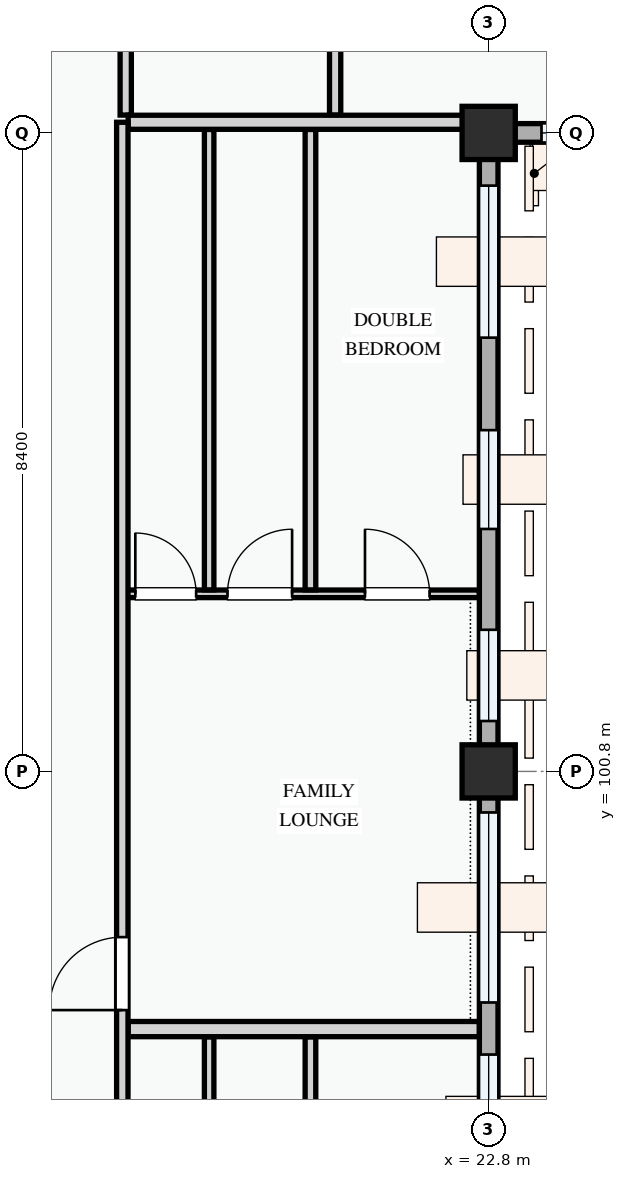
"""IFC4 building model, lengths in metres.
Left out: names, types, materials, properties, quantities, classifications, styles, units other than length and angle.
Written with IfcOpenShell. Run it as: python <this file> out.ifc"""

import sys

from ifc_helpers import new_model, si_unit, direction, frame, frame_2d, origin, origin_2d, place, context, subcontext, project, spatial, rectangle, extrude, element, fill, save


model = new_model("IFC4")
c1 = context("Model", 3, precision=1e-05, world=origin(), true_north=direction((0.0, 1.0)))
c2 = subcontext(c1, "Body", "Model", "MODEL_VIEW")
j1 = project(units=[si_unit("LENGTHUNIT", "METRE"), si_unit("PLANEANGLEUNIT", "RADIAN")], contexts=[c1])
p1 = place(None, origin())
s1 = spatial("IfcSite", under=j1, at=p1, CompositionType="ELEMENT")
p2 = place(p1, origin())
s2 = spatial("IfcBuilding", under=s1, at=p2, CompositionType="ELEMENT")
p3 = place(p2, frame((0.0, 0.0, 8.1)))
s3 = spatial("IfcBuildingStorey", under=s2, at=p3, CompositionType="ELEMENT", Elevation=8.1)
for number, where, z_axis, x_axis in (
    (1, (22.8, 100.8, 0.0), (0.0, 0.0, 1.0), (1.0, 0.0, 0.0)),
    (2, (22.8, 109.2, 0.0), (0.0, 0.0, 1.0), (1.0, 0.0, 0.0)),
):
    element("IfcColumn", number, at=place(p3, frame(where, z_axis=z_axis, x_axis=x_axis)), inside=s3, PredefinedType="COLUMN", context=c2, shape_type="SweptSolid", body=[
        extrude(rectangle(XDim=0.7, YDim=0.7, at=origin_2d()), origin(), (0.0, 0.0, 1.0), 3.3),
    ])
p4 = place(p3, frame((22.8, 109.2, 0.0), z_axis=(0.0, 0.0, 1.0), x_axis=(1.0, 0.0, 0.0)))
e3 = element("IfcWall", 3, at=p4, inside=s3, PredefinedType="STANDARD", context=c2, shape_type="SweptSolid", body=[
    extrude(rectangle(XDim=6.0, YDim=0.245, at=frame_2d((3.0, 0.0))), origin(), (0.0, 0.0, 1.0), 2.475),
])
p5 = place(p4, frame((0.695, 0.0, 0.78)))
e4 = element("IfcOpeningElement", 4, at=p5, cuts=e3, PredefinedType="OPENING", context=c2, shape_type="SweptSolid", body=[
    extrude(rectangle(XDim=1.15, YDim=1.25, at=frame_2d((0.575, 0.625))), frame((0.0, 0.133, 0.0), z_axis=(0.0, -1.0, 0.0), x_axis=(1.0, 0.0, 0.0)), (0.0, 0.0, 1.0), 0.265),
])
p6 = place(p4, frame((3.205, 0.0, 0.78)))
e5 = element("IfcOpeningElement", 5, at=p6, cuts=e3, PredefinedType="OPENING", context=c2, shape_type="SweptSolid", body=[
    extrude(rectangle(XDim=1.75, YDim=1.45, at=frame_2d((0.875, 0.725))), frame((0.0, 0.133, 0.0), z_axis=(0.0, -1.0, 0.0), x_axis=(1.0, 0.0, 0.0)), (0.0, 0.0, 1.0), 0.265),
])
p7 = place(p3, frame((22.8, 94.8, 0.0), z_axis=(0.0, 0.0, 1.0), x_axis=(0.0, 1.0, 0.0)))
e6 = element("IfcWall", 6, at=p7, inside=s3, PredefinedType="STANDARD", context=c2, shape_type="SweptSolid", body=[
    extrude(rectangle(XDim=6.0, YDim=0.245, at=frame_2d((3.0, 0.0))), origin(), (0.0, 0.0, 1.0), 2.575),
])
p8 = place(p7, frame((0.525, 0.0, 0.78)))
e7 = element("IfcOpeningElement", 7, at=p8, cuts=e6, PredefinedType="OPENING", context=c2, shape_type="SweptSolid", body=[
    extrude(rectangle(XDim=1.75, YDim=1.45, at=frame_2d((0.875, 0.725))), frame((0.0, 0.133, 0.0), z_axis=(0.0, -1.0, 0.0), x_axis=(1.0, 0.0, 0.0)), (0.0, 0.0, 1.0), 0.265),
])
p9 = place(p7, frame((2.96, 0.0, 0.78)))
e8 = element("IfcOpeningElement", 8, at=p9, cuts=e6, PredefinedType="OPENING", context=c2, shape_type="SweptSolid", body=[
    extrude(rectangle(XDim=2.5, YDim=1.6, at=frame_2d((1.25, 0.8))), frame((0.0, 0.133, 0.0), z_axis=(0.0, -1.0, 0.0), x_axis=(1.0, 0.0, 0.0)), (0.0, 0.0, 1.0), 0.265),
])
p10 = place(p3, frame((22.8, 100.8, 0.0), z_axis=(0.0, 0.0, 1.0), x_axis=(0.0, 1.0, 0.0)))
e9 = element("IfcWall", 9, at=p10, inside=s3, PredefinedType="STANDARD", context=c2, shape_type="SweptSolid", body=[
    extrude(rectangle(XDim=8.4, YDim=0.245, at=frame_2d((4.2, 0.0))), origin(), (0.0, 0.0, 1.0), 2.425),
])
p11 = place(p10, frame((0.663, 0.0, 0.78)))
e10 = element("IfcOpeningElement", 10, at=p11, cuts=e9, PredefinedType="OPENING", context=c2, shape_type="SweptSolid", body=[
    extrude(rectangle(XDim=1.2, YDim=1.5, at=frame_2d((0.6, 0.75))), frame((0.0, 0.133, 0.0), z_axis=(0.0, -1.0, 0.0), x_axis=(1.0, 0.0, 0.0)), (0.0, 0.0, 1.0), 0.265),
])
p12 = place(p10, frame((3.19, 0.0, 0.78)))
e11 = element("IfcOpeningElement", 11, at=p12, cuts=e9, PredefinedType="OPENING", context=c2, shape_type="SweptSolid", body=[
    extrude(rectangle(XDim=1.3, YDim=1.4, at=frame_2d((0.65, 0.7))), frame((0.0, 0.133, 0.0), z_axis=(0.0, -1.0, 0.0), x_axis=(1.0, 0.0, 0.0)), (0.0, 0.0, 1.0), 0.265),
])
p13 = place(p10, frame((5.707, 0.0, 0.78)))
e12 = element("IfcOpeningElement", 12, at=p13, cuts=e9, PredefinedType="OPENING", context=c2, shape_type="SweptSolid", body=[
    extrude(rectangle(XDim=2.0, YDim=1.5, at=frame_2d((1.0, 0.75))), frame((0.0, 0.133, 0.0), z_axis=(0.0, -1.0, 0.0), x_axis=(1.0, 0.0, 0.0)), (0.0, 0.0, 1.0), 0.265),
])
for number, where, z_axis, x_axis in (
    (13, (18.025, 113.324, 0.0), (0.0, 0.0, 1.0), (0.0, -1.0, 0.0)),
    (14, (20.78, 113.324, 0.0), (0.0, 0.0, 1.0), (0.0, -1.0, 0.0)),
):
    element("IfcWall", number, at=place(p3, frame(where, z_axis=z_axis, x_axis=x_axis)), inside=s3, PredefinedType="PARTITIONING", context=c2, shape_type="SweptSolid", body=[
        extrude(rectangle(XDim=3.889, YDim=0.148, at=frame_2d((1.945, 0.0))), origin(), (0.0, 0.0, 1.0), 3.0),
    ])
p14 = place(p3, frame((20.455, 90.822, 0.0), z_axis=(0.0, 0.0, 1.0), x_axis=(0.0, 1.0, 0.0)))
e15 = element("IfcWall", 15, at=p14, inside=s3, PredefinedType="PARTITIONING", context=c2, shape_type="SweptSolid", body=[
    extrude(rectangle(XDim=6.487, YDim=0.14, at=frame_2d((3.243, 0.0))), origin(), (0.0, 0.0, 1.0), 3.0),
])
p15 = place(p3, frame((19.122, 90.822, 0.0), z_axis=(0.0, 0.0, 1.0), x_axis=(0.0, 1.0, 0.0)))
e16 = element("IfcWall", 16, at=p15, inside=s3, PredefinedType="PARTITIONING", context=c2, shape_type="SweptSolid", body=[
    extrude(rectangle(XDim=6.487, YDim=0.125, at=frame_2d((3.243, 0.0))), origin(), (0.0, 0.0, 1.0), 3.0),
])
p16 = place(p3, frame((17.98, 103.136, 0.0), z_axis=(0.0, 0.0, 1.0), x_axis=(1.0, 0.0, 0.0)))
e17 = element("IfcWall", 17, at=p16, inside=s3, PredefinedType="PARTITIONING", context=c2, shape_type="SweptSolid", body=[
    extrude(rectangle(XDim=4.696, YDim=0.1, at=frame_2d((2.348, 0.0))), origin(), (0.0, 0.0, 1.0), 3.0),
])
p17 = place(p16, frame((0.171, 0.0, 0.0)))
e18 = element("IfcOpeningElement", 18, at=p17, cuts=e17, PredefinedType="OPENING", context=c2, shape_type="SweptSolid", body=[
    extrude(rectangle(XDim=0.8, YDim=2.1, at=frame_2d((0.4, 1.05))), frame((0.0, 0.06, 0.0), z_axis=(0.0, -1.0, 0.0), x_axis=(1.0, 0.0, 0.0)), (0.0, 0.0, 1.0), 0.12),
])
p18 = place(p16, frame((1.384, 0.0, 0.0)))
e19 = element("IfcOpeningElement", 19, at=p18, cuts=e17, PredefinedType="OPENING", context=c2, shape_type="SweptSolid", body=[
    extrude(rectangle(XDim=0.85, YDim=2.1, at=frame_2d((0.425, 1.05))), frame((0.0, 0.06, 0.0), z_axis=(0.0, -1.0, 0.0), x_axis=(1.0, 0.0, 0.0)), (0.0, 0.0, 1.0), 0.12),
])
p19 = place(p16, frame((3.193, 0.0, 0.0)))
e20 = element("IfcOpeningElement", 20, at=p19, cuts=e17, PredefinedType="OPENING", context=c2, shape_type="SweptSolid", body=[
    extrude(rectangle(XDim=0.85, YDim=2.1, at=frame_2d((0.425, 1.05))), frame((0.0, 0.06, 0.0), z_axis=(0.0, -1.0, 0.0), x_axis=(1.0, 0.0, 0.0)), (0.0, 0.0, 1.0), 0.12),
])
p20 = place(p3, frame((20.455, 103.188, 0.0), z_axis=(0.0, 0.0, 1.0), x_axis=(0.0, 1.0, 0.0)))
e21 = element("IfcWall", 21, at=p20, inside=s3, PredefinedType="PARTITIONING", context=c2, shape_type="SweptSolid", body=[
    extrude(rectangle(XDim=6.057, YDim=0.14, at=frame_2d((3.029, 0.0))), origin(), (0.0, 0.0, 1.0), 3.0),
])
p21 = place(p3, frame((19.122, 103.188, 0.0), z_axis=(0.0, 0.0, 1.0), x_axis=(0.0, 1.0, 0.0)))
e22 = element("IfcWall", 22, at=p21, inside=s3, PredefinedType="PARTITIONING", context=c2, shape_type="SweptSolid", body=[
    extrude(rectangle(XDim=6.057, YDim=0.125, at=frame_2d((3.029, 0.0))), origin(), (0.0, 0.0, 1.0), 3.0),
])
p22 = place(p3, frame((18.057, 97.41, 0.0), z_axis=(0.0, 0.0, 1.0), x_axis=(1.0, 0.0, 0.0)))
e23 = element("IfcWall", 23, at=p22, inside=s3, PredefinedType="PARTITIONING", context=c2, shape_type="SweptSolid", body=[
    extrude(rectangle(XDim=4.619, YDim=0.2, at=frame_2d((2.309, 0.0))), origin(), (0.0, 0.0, 1.0), 3.0),
])
p23 = place(p3, frame((18.057, 109.34, 0.0), z_axis=(0.0, 0.0, 1.0), x_axis=(1.0, 0.0, 0.0)))
e24 = element("IfcWall", 24, at=p23, inside=s3, PredefinedType="PARTITIONING", context=c2, shape_type="SweptSolid", body=[
    extrude(rectangle(XDim=4.683, YDim=0.185, at=frame_2d((2.342, 0.0))), origin(), (0.0, 0.0, 1.0), 2.375),
])
p24 = place(p3, frame((17.98, 72.125, 0.0), z_axis=(0.0, 0.0, 1.0), x_axis=(0.0, 1.0, 0.0)))
e25 = element("IfcWall", 25, at=p24, inside=s3, PredefinedType="PARTITIONING", context=c2, shape_type="SweptSolid", body=[
    extrude(rectangle(XDim=37.216, YDim=0.15, at=frame_2d((18.608, 0.0))), origin(), (0.0, 0.0, 1.0), 3.0),
])
p25 = place(p24, frame((3.619, 0.0, 0.0)))
e26 = element("IfcOpeningElement", 26, at=p25, cuts=e25, PredefinedType="OPENING", context=c2, shape_type="SweptSolid", body=[
    extrude(rectangle(XDim=0.92, YDim=2.1, at=frame_2d((0.46, 1.05))), frame((0.0, 0.085, 0.0), z_axis=(0.0, -1.0, 0.0), x_axis=(1.0, 0.0, 0.0)), (0.0, 0.0, 1.0), 0.17),
])
p26 = place(p24, frame((17.435, 0.0, 0.0)))
e27 = element("IfcOpeningElement", 27, at=p26, cuts=e25, PredefinedType="OPENING", context=c2, shape_type="SweptSolid", body=[
    extrude(rectangle(XDim=0.92, YDim=2.1, at=frame_2d((0.46, 1.05))), frame((0.0, 0.085, 0.0), z_axis=(0.0, -1.0, 0.0), x_axis=(1.0, 0.0, 0.0)), (0.0, 0.0, 1.0), 0.17),
])
p27 = place(p24, frame((25.535, 0.0, 0.0)))
e28 = element("IfcOpeningElement", 28, at=p27, cuts=e25, PredefinedType="OPENING", context=c2, shape_type="SweptSolid", body=[
    extrude(rectangle(XDim=0.96, YDim=2.12, at=frame_2d((0.48, 1.06))), frame((0.0, 0.085, 0.0), z_axis=(0.0, -1.0, 0.0), x_axis=(1.0, 0.0, 0.0)), (0.0, 0.0, 1.0), 0.17),
])
p28 = place(p5, origin())
e29 = element("IfcWindow", 29, at=p28, inside=s3, PartitioningType="SINGLE_PANEL", PredefinedType="WINDOW", context=c2, shape_type="SweptSolid", body=[
    extrude(rectangle(XDim=1.15, YDim=1.25, at=frame_2d((0.575, 0.625))), frame((0.0, 0.03, 0.0), z_axis=(0.0, -1.0, 0.0), x_axis=(1.0, 0.0, 0.0)), (0.0, 0.0, 1.0), 0.06),
])
fill(e4, e29)
p29 = place(p8, origin())
e30 = element("IfcWindow", 30, at=p29, inside=s3, PartitioningType="DOUBLE_PANEL_VERTICAL", PredefinedType="WINDOW", context=c2, shape_type="SweptSolid", body=[
    extrude(rectangle(XDim=1.75, YDim=1.45, at=frame_2d((0.875, 0.725))), frame((0.0, 0.03, 0.0), z_axis=(0.0, -1.0, 0.0), x_axis=(1.0, 0.0, 0.0)), (0.0, 0.0, 1.0), 0.06),
])
fill(e7, e30)
p30 = place(p9, origin())
e31 = element("IfcWindow", 31, at=p30, inside=s3, PartitioningType="DOUBLE_PANEL_VERTICAL", PredefinedType="WINDOW", context=c2, shape_type="SweptSolid", body=[
    extrude(rectangle(XDim=2.5, YDim=1.6, at=frame_2d((1.25, 0.8))), frame((0.0, 0.03, 0.0), z_axis=(0.0, -1.0, 0.0), x_axis=(1.0, 0.0, 0.0)), (0.0, 0.0, 1.0), 0.06),
])
fill(e8, e31)
p31 = place(p11, origin())
e32 = element("IfcWindow", 32, at=p31, inside=s3, PartitioningType="SINGLE_PANEL", PredefinedType="WINDOW", context=c2, shape_type="SweptSolid", body=[
    extrude(rectangle(XDim=1.2, YDim=1.5, at=frame_2d((0.6, 0.75))), frame((0.0, 0.03, 0.0), z_axis=(0.0, -1.0, 0.0), x_axis=(1.0, 0.0, 0.0)), (0.0, 0.0, 1.0), 0.06),
])
fill(e10, e32)
p32 = place(p12, origin())
e33 = element("IfcWindow", 33, at=p32, inside=s3, PartitioningType="SINGLE_PANEL", PredefinedType="WINDOW", context=c2, shape_type="SweptSolid", body=[
    extrude(rectangle(XDim=1.3, YDim=1.4, at=frame_2d((0.65, 0.7))), frame((0.0, 0.03, 0.0), z_axis=(0.0, -1.0, 0.0), x_axis=(1.0, 0.0, 0.0)), (0.0, 0.0, 1.0), 0.06),
])
fill(e11, e33)
p33 = place(p13, origin())
e34 = element("IfcWindow", 34, at=p33, inside=s3, PartitioningType="DOUBLE_PANEL_VERTICAL", PredefinedType="WINDOW", context=c2, shape_type="SweptSolid", body=[
    extrude(rectangle(XDim=2.0, YDim=1.5, at=frame_2d((1.0, 0.75))), frame((0.0, 0.03, 0.0), z_axis=(0.0, -1.0, 0.0), x_axis=(1.0, 0.0, 0.0)), (0.0, 0.0, 1.0), 0.06),
])
fill(e12, e34)
p34 = place(p17, origin())
e35 = element("IfcDoor", 35, at=p34, inside=s3, OperationType="SINGLE_SWING_LEFT", PredefinedType="DOOR", context=c2, shape_type="SweptSolid", body=[
    extrude(rectangle(XDim=0.8, YDim=2.1, at=frame_2d((0.4, 1.05))), frame((0.0, 0.025, 0.0), z_axis=(0.0, -1.0, 0.0), x_axis=(1.0, 0.0, 0.0)), (0.0, 0.0, 1.0), 0.05),
])
fill(e18, e35)
p35 = place(p18, origin())
e36 = element("IfcDoor", 36, at=p35, inside=s3, OperationType="SINGLE_SWING_RIGHT", PredefinedType="DOOR", context=c2, shape_type="SweptSolid", body=[
    extrude(rectangle(XDim=0.85, YDim=2.1, at=frame_2d((0.425, 1.05))), frame((0.0, 0.025, 0.0), z_axis=(0.0, -1.0, 0.0), x_axis=(1.0, 0.0, 0.0)), (0.0, 0.0, 1.0), 0.05),
])
fill(e19, e36)
p36 = place(p19, origin())
e37 = element("IfcDoor", 37, at=p36, inside=s3, OperationType="SINGLE_SWING_LEFT", PredefinedType="DOOR", context=c2, shape_type="SweptSolid", body=[
    extrude(rectangle(XDim=0.85, YDim=2.1, at=frame_2d((0.425, 1.05))), frame((0.0, 0.025, 0.0), z_axis=(0.0, -1.0, 0.0), x_axis=(1.0, 0.0, 0.0)), (0.0, 0.0, 1.0), 0.05),
])
fill(e20, e37)
p37 = place(p27, origin())
e38 = element("IfcDoor", 38, at=p37, inside=s3, OperationType="SINGLE_SWING_LEFT", PredefinedType="DOOR", context=c2, shape_type="SweptSolid", body=[
    extrude(rectangle(XDim=0.96, YDim=2.12, at=frame_2d((0.48, 1.06))), frame((0.0, 0.025, 0.0), z_axis=(0.0, -1.0, 0.0), x_axis=(1.0, 0.0, 0.0)), (0.0, 0.0, 1.0), 0.05),
])
fill(e28, e38)
save(model, sys.argv[1])
